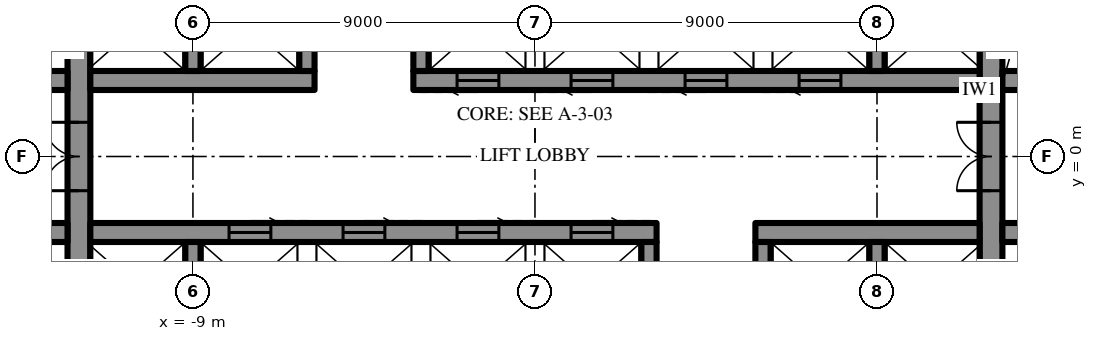
"""IFC4 building model, lengths in metres.
Left out: names, types, materials, properties, quantities, classifications, styles, units other than length and angle.
Written with IfcOpenShell. Run it as: python <this file> out.ifc"""

import sys

from ifc_helpers import new_model, si_unit, direction, frame, frame_2d, origin, place, context, subcontext, project, spatial, rectangle, extrude, element, fill, save


model = new_model("IFC4")
c1 = context("Model", 3, precision=1e-05, world=origin(), true_north=direction((0.0, 1.0)))
c2 = subcontext(c1, "Body", "Model", "MODEL_VIEW")
j1 = project(units=[si_unit("LENGTHUNIT", "METRE"), si_unit("PLANEANGLEUNIT", "RADIAN")], contexts=[c1])
p1 = place(None, origin())
s1 = spatial("IfcSite", under=j1, at=p1, CompositionType="ELEMENT")
p2 = place(p1, origin())
s2 = spatial("IfcBuilding", under=s1, at=p2, CompositionType="ELEMENT")
p3 = place(p2, frame((0.0, 0.0, 265.9)))
s3 = spatial("IfcBuildingStorey", under=s2, at=p3, CompositionType="ELEMENT", Elevation=265.9)
p4 = place(p3, frame((12.0, -10.7, 0.0), z_axis=(0.0, 0.0, 1.0), x_axis=(0.0, 1.0, 0.0)))
e1 = element("IfcWall", 1, at=p4, inside=s3, PredefinedType="SHEAR", context=c2, shape_type="SweptSolid", body=[
    extrude(rectangle(XDim=21.4, YDim=0.6, at=frame_2d((10.7, 0.0))), origin(), (0.0, 0.0, 1.0), 4.2),
])
p5 = place(p4, frame((9.8, 0.0, 0.0)))
e2 = element("IfcOpeningElement", 2, at=p5, cuts=e1, PredefinedType="OPENING", context=c2, shape_type="SweptSolid", body=[
    extrude(rectangle(XDim=1.8, YDim=2.4, at=frame_2d((0.9, 1.2))), frame((0.0, 0.31, 0.0), z_axis=(0.0, -1.0, 0.0), x_axis=(1.0, 0.0, 0.0)), (0.0, 0.0, 1.0), 0.62),
])
p6 = place(p3, frame((-12.0, -10.7, 0.0), z_axis=(0.0, 0.0, 1.0), x_axis=(0.0, 1.0, 0.0)))
e3 = element("IfcWall", 3, at=p6, inside=s3, PredefinedType="SHEAR", context=c2, shape_type="SweptSolid", body=[
    extrude(rectangle(XDim=21.4, YDim=0.6, at=frame_2d((10.7, 0.0))), origin(), (0.0, 0.0, 1.0), 4.2),
])
p7 = place(p6, frame((9.8, 0.0, 0.0)))
e4 = element("IfcOpeningElement", 4, at=p7, cuts=e3, PredefinedType="OPENING", context=c2, shape_type="SweptSolid", body=[
    extrude(rectangle(XDim=1.8, YDim=2.4, at=frame_2d((0.9, 1.2))), frame((0.0, 0.31, 0.0), z_axis=(0.0, -1.0, 0.0), x_axis=(1.0, 0.0, 0.0)), (0.0, 0.0, 1.0), 0.62),
])
p8 = place(p3, frame((-14.5, 2.0, 0.0), z_axis=(0.0, 0.0, 1.0), x_axis=(1.0, 0.0, 0.0)))
e5 = element("IfcWall", 5, at=p8, inside=s3, PredefinedType="SHEAR", context=c2, shape_type="SweptSolid", body=[
    extrude(rectangle(XDim=2.2, YDim=0.5, at=frame_2d((1.1, 0.0))), origin(), (0.0, 0.0, 1.0), 4.2),
])
p9 = place(p8, frame((0.5, 0.0, 0.0)))
e6 = element("IfcOpeningElement", 6, at=p9, cuts=e5, PredefinedType="OPENING", context=c2, shape_type="SweptSolid", body=[
    extrude(rectangle(XDim=0.9, YDim=2.2, at=frame_2d((0.45, 1.1))), frame((0.0, 0.26, 0.0), z_axis=(0.0, -1.0, 0.0), x_axis=(1.0, 0.0, 0.0)), (0.0, 0.0, 1.0), 0.52),
])
p10 = place(p3, frame((-11.7, 2.0, 0.0), z_axis=(0.0, 0.0, 1.0), x_axis=(1.0, 0.0, 0.0)))
e7 = element("IfcWall", 7, at=p10, inside=s3, PredefinedType="SHEAR", context=c2, shape_type="SweptSolid", body=[
    extrude(rectangle(XDim=5.9, YDim=0.5, at=frame_2d((2.95, 0.0))), origin(), (0.0, 0.0, 1.0), 4.2),
])
p11 = place(p3, frame((-3.2, 2.0, 0.0), z_axis=(0.0, 0.0, 1.0), x_axis=(1.0, 0.0, 0.0)))
e8 = element("IfcWall", 8, at=p11, inside=s3, PredefinedType="SHEAR", context=c2, shape_type="SweptSolid", body=[
    extrude(rectangle(XDim=14.9, YDim=0.5, at=frame_2d((7.45, 0.0))), origin(), (0.0, 0.0, 1.0), 4.2),
])
p12 = place(p11, frame((1.15, 0.0, 0.0)))
e9 = element("IfcOpeningElement", 9, at=p12, cuts=e8, PredefinedType="OPENING", context=c2, shape_type="SweptSolid", body=[
    extrude(rectangle(XDim=1.1, YDim=2.2, at=frame_2d((0.55, 1.1))), frame((0.0, 0.26, 0.0), z_axis=(0.0, -1.0, 0.0), x_axis=(1.0, 0.0, 0.0)), (0.0, 0.0, 1.0), 0.52),
])
p13 = place(p11, frame((4.15, 0.0, 0.0)))
e10 = element("IfcOpeningElement", 10, at=p13, cuts=e8, PredefinedType="OPENING", context=c2, shape_type="SweptSolid", body=[
    extrude(rectangle(XDim=1.1, YDim=2.2, at=frame_2d((0.55, 1.1))), frame((0.0, 0.26, 0.0), z_axis=(0.0, -1.0, 0.0), x_axis=(1.0, 0.0, 0.0)), (0.0, 0.0, 1.0), 0.52),
])
p14 = place(p11, frame((7.15, 0.0, 0.0)))
e11 = element("IfcOpeningElement", 11, at=p14, cuts=e8, PredefinedType="OPENING", context=c2, shape_type="SweptSolid", body=[
    extrude(rectangle(XDim=1.1, YDim=2.2, at=frame_2d((0.55, 1.1))), frame((0.0, 0.26, 0.0), z_axis=(0.0, -1.0, 0.0), x_axis=(1.0, 0.0, 0.0)), (0.0, 0.0, 1.0), 0.52),
])
p15 = place(p11, frame((10.15, 0.0, 0.0)))
e12 = element("IfcOpeningElement", 12, at=p15, cuts=e8, PredefinedType="OPENING", context=c2, shape_type="SweptSolid", body=[
    extrude(rectangle(XDim=1.1, YDim=2.2, at=frame_2d((0.55, 1.1))), frame((0.0, 0.26, 0.0), z_axis=(0.0, -1.0, 0.0), x_axis=(1.0, 0.0, 0.0)), (0.0, 0.0, 1.0), 0.52),
])
p16 = place(p3, frame((12.3, 2.0, 0.0), z_axis=(0.0, 0.0, 1.0), x_axis=(1.0, 0.0, 0.0)))
e13 = element("IfcWall", 13, at=p16, inside=s3, PredefinedType="SHEAR", context=c2, shape_type="SweptSolid", body=[
    extrude(rectangle(XDim=2.2, YDim=0.5, at=frame_2d((1.1, 0.0))), origin(), (0.0, 0.0, 1.0), 4.2),
])
p17 = place(p16, frame((0.8, 0.0, 0.0)))
e14 = element("IfcOpeningElement", 14, at=p17, cuts=e13, PredefinedType="OPENING", context=c2, shape_type="SweptSolid", body=[
    extrude(rectangle(XDim=0.9, YDim=2.2, at=frame_2d((0.45, 1.1))), frame((0.0, 0.26, 0.0), z_axis=(0.0, -1.0, 0.0), x_axis=(1.0, 0.0, 0.0)), (0.0, 0.0, 1.0), 0.52),
])
for number, where, z_axis, x_axis in (
    (15, (-9.0, 2.25, 0.0), (0.0, 0.0, 1.0), (0.0, 1.0, 0.0)),
    (16, (-6.0, 2.25, 0.0), (0.0, 0.0, 1.0), (0.0, 1.0, 0.0)),
    (17, (-3.0, 2.25, 0.0), (0.0, 0.0, 1.0), (0.0, 1.0, 0.0)),
    (18, (9.0, 2.25, 0.0), (0.0, 0.0, 1.0), (0.0, 1.0, 0.0)),
):
    element("IfcWall", number, at=place(p3, frame(where, z_axis=z_axis, x_axis=x_axis)), inside=s3, PredefinedType="SHEAR", context=c2, shape_type="SweptSolid", body=[
        extrude(rectangle(XDim=2.3, YDim=0.4, at=frame_2d((1.15, 0.0))), origin(), (0.0, 0.0, 1.0), 4.2),
    ])
p18 = place(p3, frame((14.5, -2.0, 0.0), z_axis=(0.0, 0.0, 1.0), x_axis=(-1.0, 0.0, 0.0)))
e19 = element("IfcWall", 19, at=p18, inside=s3, PredefinedType="SHEAR", context=c2, shape_type="SweptSolid", body=[
    extrude(rectangle(XDim=2.2, YDim=0.5, at=frame_2d((1.1, 0.0))), origin(), (0.0, 0.0, 1.0), 4.2),
])
p19 = place(p18, frame((0.5, 0.0, 0.0)))
e20 = element("IfcOpeningElement", 20, at=p19, cuts=e19, PredefinedType="OPENING", context=c2, shape_type="SweptSolid", body=[
    extrude(rectangle(XDim=0.9, YDim=2.2, at=frame_2d((0.45, 1.1))), frame((0.0, 0.26, 0.0), z_axis=(0.0, -1.0, 0.0), x_axis=(1.0, 0.0, 0.0)), (0.0, 0.0, 1.0), 0.52),
])
p20 = place(p3, frame((11.7, -2.0, 0.0), z_axis=(0.0, 0.0, 1.0), x_axis=(-1.0, 0.0, 0.0)))
e21 = element("IfcWall", 21, at=p20, inside=s3, PredefinedType="SHEAR", context=c2, shape_type="SweptSolid", body=[
    extrude(rectangle(XDim=5.9, YDim=0.5, at=frame_2d((2.95, 0.0))), origin(), (0.0, 0.0, 1.0), 4.2),
])
p21 = place(p3, frame((3.2, -2.0, 0.0), z_axis=(0.0, 0.0, 1.0), x_axis=(-1.0, 0.0, 0.0)))
e22 = element("IfcWall", 22, at=p21, inside=s3, PredefinedType="SHEAR", context=c2, shape_type="SweptSolid", body=[
    extrude(rectangle(XDim=14.9, YDim=0.5, at=frame_2d((7.45, 0.0))), origin(), (0.0, 0.0, 1.0), 4.2),
])
p22 = place(p21, frame((1.15, 0.0, 0.0)))
e23 = element("IfcOpeningElement", 23, at=p22, cuts=e22, PredefinedType="OPENING", context=c2, shape_type="SweptSolid", body=[
    extrude(rectangle(XDim=1.1, YDim=2.2, at=frame_2d((0.55, 1.1))), frame((0.0, 0.26, 0.0), z_axis=(0.0, -1.0, 0.0), x_axis=(1.0, 0.0, 0.0)), (0.0, 0.0, 1.0), 0.52),
])
p23 = place(p21, frame((4.15, 0.0, 0.0)))
e24 = element("IfcOpeningElement", 24, at=p23, cuts=e22, PredefinedType="OPENING", context=c2, shape_type="SweptSolid", body=[
    extrude(rectangle(XDim=1.1, YDim=2.2, at=frame_2d((0.55, 1.1))), frame((0.0, 0.26, 0.0), z_axis=(0.0, -1.0, 0.0), x_axis=(1.0, 0.0, 0.0)), (0.0, 0.0, 1.0), 0.52),
])
p24 = place(p21, frame((7.15, 0.0, 0.0)))
e25 = element("IfcOpeningElement", 25, at=p24, cuts=e22, PredefinedType="OPENING", context=c2, shape_type="SweptSolid", body=[
    extrude(rectangle(XDim=1.1, YDim=2.2, at=frame_2d((0.55, 1.1))), frame((0.0, 0.26, 0.0), z_axis=(0.0, -1.0, 0.0), x_axis=(1.0, 0.0, 0.0)), (0.0, 0.0, 1.0), 0.52),
])
p25 = place(p21, frame((10.15, 0.0, 0.0)))
e26 = element("IfcOpeningElement", 26, at=p25, cuts=e22, PredefinedType="OPENING", context=c2, shape_type="SweptSolid", body=[
    extrude(rectangle(XDim=1.1, YDim=2.2, at=frame_2d((0.55, 1.1))), frame((0.0, 0.26, 0.0), z_axis=(0.0, -1.0, 0.0), x_axis=(1.0, 0.0, 0.0)), (0.0, 0.0, 1.0), 0.52),
])
p26 = place(p3, frame((-12.3, -2.0, 0.0), z_axis=(0.0, 0.0, 1.0), x_axis=(-1.0, 0.0, 0.0)))
e27 = element("IfcWall", 27, at=p26, inside=s3, PredefinedType="SHEAR", context=c2, shape_type="SweptSolid", body=[
    extrude(rectangle(XDim=2.2, YDim=0.5, at=frame_2d((1.1, 0.0))), origin(), (0.0, 0.0, 1.0), 4.2),
])
p27 = place(p26, frame((0.8, 0.0, 0.0)))
e28 = element("IfcOpeningElement", 28, at=p27, cuts=e27, PredefinedType="OPENING", context=c2, shape_type="SweptSolid", body=[
    extrude(rectangle(XDim=0.9, YDim=2.2, at=frame_2d((0.45, 1.1))), frame((0.0, 0.26, 0.0), z_axis=(0.0, -1.0, 0.0), x_axis=(1.0, 0.0, 0.0)), (0.0, 0.0, 1.0), 0.52),
])
for number, where, z_axis, x_axis in (
    (29, (9.0, -2.25, 0.0), (0.0, 0.0, 1.0), (0.0, -1.0, 0.0)),
    (30, (6.0, -2.25, 0.0), (0.0, 0.0, 1.0), (0.0, -1.0, 0.0)),
    (31, (3.0, -2.25, 0.0), (0.0, 0.0, 1.0), (0.0, -1.0, 0.0)),
    (32, (-9.0, -2.25, 0.0), (0.0, 0.0, 1.0), (0.0, -1.0, 0.0)),
):
    element("IfcWall", number, at=place(p3, frame(where, z_axis=z_axis, x_axis=x_axis)), inside=s3, PredefinedType="SHEAR", context=c2, shape_type="SweptSolid", body=[
        extrude(rectangle(XDim=2.3, YDim=0.4, at=frame_2d((1.15, 0.0))), origin(), (0.0, 0.0, 1.0), 4.2),
    ])
p28 = place(p5, origin())
e33 = element("IfcDoor", 33, at=p28, inside=s3, OperationType="DOUBLE_DOOR_SINGLE_SWING", PredefinedType="DOOR", context=c2, shape_type="SweptSolid", body=[
    extrude(rectangle(XDim=1.8, YDim=2.4, at=frame_2d((0.9, 1.2))), frame((0.0, 0.025, 0.0), z_axis=(0.0, -1.0, 0.0), x_axis=(1.0, 0.0, 0.0)), (0.0, 0.0, 1.0), 0.05),
])
fill(e2, e33)
p29 = place(p7, origin())
e34 = element("IfcDoor", 34, at=p29, inside=s3, OperationType="DOUBLE_DOOR_SINGLE_SWING", PredefinedType="DOOR", context=c2, shape_type="SweptSolid", body=[
    extrude(rectangle(XDim=1.8, YDim=2.4, at=frame_2d((0.9, 1.2))), frame((0.0, 0.025, 0.0), z_axis=(0.0, -1.0, 0.0), x_axis=(1.0, 0.0, 0.0)), (0.0, 0.0, 1.0), 0.05),
])
fill(e4, e34)
p30 = place(p12, frame((1.1, 0.0, 0.0), z_axis=(0.0, 0.0, 1.0), x_axis=(-1.0, 0.0, 0.0)))
e35 = element("IfcDoor", 35, at=p30, inside=s3, OperationType="SLIDING_TO_LEFT", PredefinedType="DOOR", context=c2, shape_type="SweptSolid", body=[
    extrude(rectangle(XDim=1.1, YDim=2.2, at=frame_2d((0.55, 1.1))), frame((0.0, 0.025, 0.0), z_axis=(0.0, -1.0, 0.0), x_axis=(1.0, 0.0, 0.0)), (0.0, 0.0, 1.0), 0.05),
])
fill(e9, e35)
p31 = place(p13, frame((1.1, 0.0, 0.0), z_axis=(0.0, 0.0, 1.0), x_axis=(-1.0, 0.0, 0.0)))
e36 = element("IfcDoor", 36, at=p31, inside=s3, OperationType="SLIDING_TO_LEFT", PredefinedType="DOOR", context=c2, shape_type="SweptSolid", body=[
    extrude(rectangle(XDim=1.1, YDim=2.2, at=frame_2d((0.55, 1.1))), frame((0.0, 0.025, 0.0), z_axis=(0.0, -1.0, 0.0), x_axis=(1.0, 0.0, 0.0)), (0.0, 0.0, 1.0), 0.05),
])
fill(e10, e36)
p32 = place(p14, frame((1.1, 0.0, 0.0), z_axis=(0.0, 0.0, 1.0), x_axis=(-1.0, 0.0, 0.0)))
e37 = element("IfcDoor", 37, at=p32, inside=s3, OperationType="SLIDING_TO_LEFT", PredefinedType="DOOR", context=c2, shape_type="SweptSolid", body=[
    extrude(rectangle(XDim=1.1, YDim=2.2, at=frame_2d((0.55, 1.1))), frame((0.0, 0.025, 0.0), z_axis=(0.0, -1.0, 0.0), x_axis=(1.0, 0.0, 0.0)), (0.0, 0.0, 1.0), 0.05),
])
fill(e11, e37)
p33 = place(p15, frame((1.1, 0.0, 0.0), z_axis=(0.0, 0.0, 1.0), x_axis=(-1.0, 0.0, 0.0)))
e38 = element("IfcDoor", 38, at=p33, inside=s3, OperationType="SLIDING_TO_LEFT", PredefinedType="DOOR", context=c2, shape_type="SweptSolid", body=[
    extrude(rectangle(XDim=1.1, YDim=2.2, at=frame_2d((0.55, 1.1))), frame((0.0, 0.025, 0.0), z_axis=(0.0, -1.0, 0.0), x_axis=(1.0, 0.0, 0.0)), (0.0, 0.0, 1.0), 0.05),
])
fill(e12, e38)
p34 = place(p22, frame((1.1, 0.0, 0.0), z_axis=(0.0, 0.0, 1.0), x_axis=(-1.0, 0.0, 0.0)))
e39 = element("IfcDoor", 39, at=p34, inside=s3, OperationType="SLIDING_TO_LEFT", PredefinedType="DOOR", context=c2, shape_type="SweptSolid", body=[
    extrude(rectangle(XDim=1.1, YDim=2.2, at=frame_2d((0.55, 1.1))), frame((0.0, 0.025, 0.0), z_axis=(0.0, -1.0, 0.0), x_axis=(1.0, 0.0, 0.0)), (0.0, 0.0, 1.0), 0.05),
])
fill(e23, e39)
p35 = place(p23, frame((1.1, 0.0, 0.0), z_axis=(0.0, 0.0, 1.0), x_axis=(-1.0, 0.0, 0.0)))
e40 = element("IfcDoor", 40, at=p35, inside=s3, OperationType="SLIDING_TO_LEFT", PredefinedType="DOOR", context=c2, shape_type="SweptSolid", body=[
    extrude(rectangle(XDim=1.1, YDim=2.2, at=frame_2d((0.55, 1.1))), frame((0.0, 0.025, 0.0), z_axis=(0.0, -1.0, 0.0), x_axis=(1.0, 0.0, 0.0)), (0.0, 0.0, 1.0), 0.05),
])
fill(e24, e40)
p36 = place(p24, frame((1.1, 0.0, 0.0), z_axis=(0.0, 0.0, 1.0), x_axis=(-1.0, 0.0, 0.0)))
e41 = element("IfcDoor", 41, at=p36, inside=s3, OperationType="SLIDING_TO_LEFT", PredefinedType="DOOR", context=c2, shape_type="SweptSolid", body=[
    extrude(rectangle(XDim=1.1, YDim=2.2, at=frame_2d((0.55, 1.1))), frame((0.0, 0.025, 0.0), z_axis=(0.0, -1.0, 0.0), x_axis=(1.0, 0.0, 0.0)), (0.0, 0.0, 1.0), 0.05),
])
fill(e25, e41)
p37 = place(p25, frame((1.1, 0.0, 0.0), z_axis=(0.0, 0.0, 1.0), x_axis=(-1.0, 0.0, 0.0)))
e42 = element("IfcDoor", 42, at=p37, inside=s3, OperationType="SLIDING_TO_LEFT", PredefinedType="DOOR", context=c2, shape_type="SweptSolid", body=[
    extrude(rectangle(XDim=1.1, YDim=2.2, at=frame_2d((0.55, 1.1))), frame((0.0, 0.025, 0.0), z_axis=(0.0, -1.0, 0.0), x_axis=(1.0, 0.0, 0.0)), (0.0, 0.0, 1.0), 0.05),
])
fill(e26, e42)
save(model, sys.argv[1])
